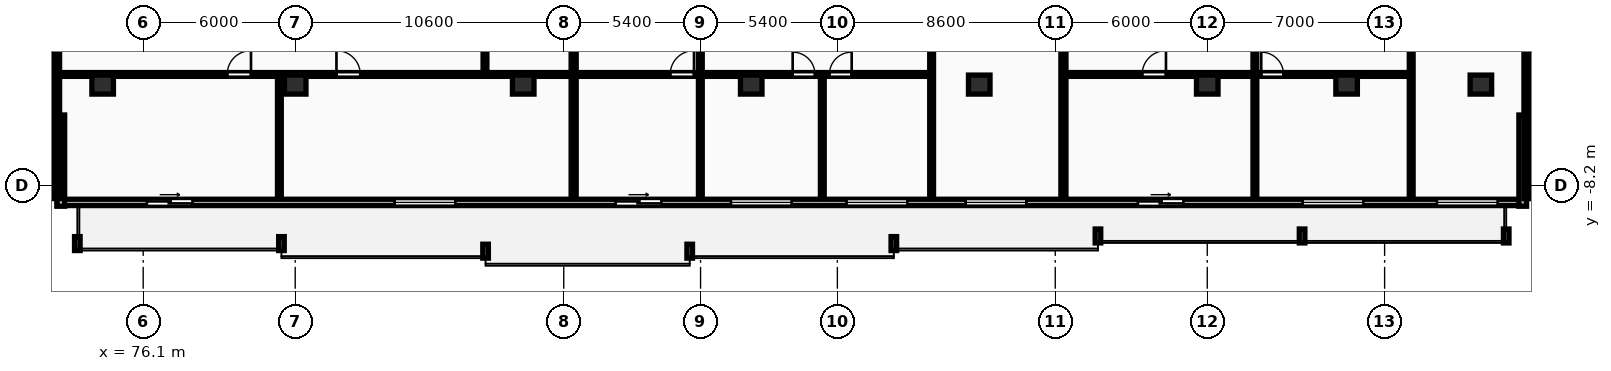
"""IFC4 building model, lengths in metres.
Left out: names, types, materials, properties, quantities, classifications, styles, units other than length and angle.
Written with IfcOpenShell. Run it as: python <this file> out.ifc"""

import sys

from ifc_helpers import new_model, si_unit, direction, frame, frame_2d, origin, origin_2d, place, context, subcontext, project, spatial, rectangle, extrude, element, fill, save


model = new_model("IFC4")
c1 = context("Model", 3, precision=1e-05, world=origin(), true_north=direction((0.0, 1.0)))
c2 = subcontext(c1, "Body", "Model", "MODEL_VIEW")
j1 = project(units=[si_unit("LENGTHUNIT", "METRE"), si_unit("PLANEANGLEUNIT", "RADIAN")], contexts=[c1])
p1 = place(None, origin())
s1 = spatial("IfcSite", under=j1, at=p1, CompositionType="ELEMENT")
p2 = place(p1, origin())
s2 = spatial("IfcBuilding", under=s1, at=p2, CompositionType="ELEMENT")
p3 = place(p2, frame((0.0, 0.0, 119.8)))
s3 = spatial("IfcBuildingStorey", under=s2, at=p3, CompositionType="ELEMENT", Elevation=119.8)
for number, where, z_axis, x_axis in (
    (1, (74.5, -4.2, 0.0), (0.0, 0.0, 1.0), (1.0, 0.0, 0.0)),
    (2, (82.1, -4.2, 0.0), (0.0, 0.0, 1.0), (1.0, 0.0, 0.0)),
    (3, (91.1, -4.2, 0.0), (0.0, 0.0, 1.0), (1.0, 0.0, 0.0)),
    (4, (100.1, -4.2, 0.0), (0.0, 0.0, 1.0), (1.0, 0.0, 0.0)),
    (5, (109.1, -4.2, 0.0), (0.0, 0.0, 1.0), (1.0, 0.0, 0.0)),
    (6, (118.1, -4.2, 0.0), (0.0, 0.0, 1.0), (1.0, 0.0, 0.0)),
    (7, (123.6, -4.2, 0.0), (0.0, 0.0, 1.0), (1.0, 0.0, 0.0)),
    (8, (128.9, -4.2, 0.0), (0.0, 0.0, 1.0), (1.0, 0.0, 0.0)),
):
    element("IfcColumn", number, at=place(p3, frame(where, z_axis=z_axis, x_axis=x_axis)), inside=s3, PredefinedType="COLUMN", context=c2, shape_type="SweptSolid", body=[
        extrude(rectangle(XDim=0.85, YDim=0.75, at=origin_2d()), origin(), (0.0, 0.0, 1.0), 3.25),
    ])
p4 = place(p3, frame((72.7, -8.85, 0.0), z_axis=(0.0, 0.0, 1.0), x_axis=(1.0, 0.0, 0.0)))
e9 = element("IfcWall", 9, at=p4, inside=s3, PredefinedType="STANDARD", context=c2, shape_type="SweptSolid", body=[
    extrude(rectangle(XDim=58.0, YDim=0.25, at=frame_2d((29.0, 0.0))), origin(), (0.0, 0.0, 1.0), 2.97),
])
p5 = place(p4, frame((3.548, 0.0, 0.0)))
e10 = element("IfcOpeningElement", 10, at=p5, cuts=e9, PredefinedType="OPENING", context=c2, shape_type="SweptSolid", body=[
    extrude(rectangle(XDim=1.8, YDim=2.2, at=frame_2d((0.9, 1.1))), frame((0.0, 0.135, 0.0), z_axis=(0.0, -1.0, 0.0), x_axis=(1.0, 0.0, 0.0)), (0.0, 0.0, 1.0), 0.27),
])
p6 = place(p4, frame((13.323, 0.0, 0.85)))
e11 = element("IfcOpeningElement", 11, at=p6, cuts=e9, PredefinedType="OPENING", context=c2, shape_type="SweptSolid", body=[
    extrude(rectangle(XDim=2.4, YDim=1.9, at=frame_2d((1.2, 0.95))), frame((0.0, 0.135, 0.0), z_axis=(0.0, -1.0, 0.0), x_axis=(1.0, 0.0, 0.0)), (0.0, 0.0, 1.0), 0.27),
])
p7 = place(p4, frame((26.598, 0.0, 0.85)))
e12 = element("IfcOpeningElement", 12, at=p7, cuts=e9, PredefinedType="OPENING", context=c2, shape_type="SweptSolid", body=[
    extrude(rectangle(XDim=2.4, YDim=1.9, at=frame_2d((1.2, 0.95))), frame((0.0, 0.135, 0.0), z_axis=(0.0, -1.0, 0.0), x_axis=(1.0, 0.0, 0.0)), (0.0, 0.0, 1.0), 0.27),
])
p8 = place(p4, frame((31.163, 0.0, 0.85)))
e13 = element("IfcOpeningElement", 13, at=p8, cuts=e9, PredefinedType="OPENING", context=c2, shape_type="SweptSolid", body=[
    extrude(rectangle(XDim=2.4, YDim=1.9, at=frame_2d((1.2, 0.95))), frame((0.0, 0.135, 0.0), z_axis=(0.0, -1.0, 0.0), x_axis=(1.0, 0.0, 0.0)), (0.0, 0.0, 1.0), 0.27),
])
p9 = place(p4, frame((22.051, 0.0, 0.0)))
e14 = element("IfcOpeningElement", 14, at=p9, cuts=e9, PredefinedType="OPENING", context=c2, shape_type="SweptSolid", body=[
    extrude(rectangle(XDim=1.8, YDim=2.2, at=frame_2d((0.9, 1.1))), frame((0.0, 0.135, 0.0), z_axis=(0.0, -1.0, 0.0), x_axis=(1.0, 0.0, 0.0)), (0.0, 0.0, 1.0), 0.27),
])
p10 = place(p4, frame((35.861, 0.0, 0.85)))
e15 = element("IfcOpeningElement", 15, at=p10, cuts=e9, PredefinedType="OPENING", context=c2, shape_type="SweptSolid", body=[
    extrude(rectangle(XDim=2.4, YDim=1.9, at=frame_2d((1.2, 0.95))), frame((0.0, 0.135, 0.0), z_axis=(0.0, -1.0, 0.0), x_axis=(1.0, 0.0, 0.0)), (0.0, 0.0, 1.0), 0.27),
])
p11 = place(p4, frame((49.165, 0.0, 0.85)))
e16 = element("IfcOpeningElement", 16, at=p11, cuts=e9, PredefinedType="OPENING", context=c2, shape_type="SweptSolid", body=[
    extrude(rectangle(XDim=2.4, YDim=1.9, at=frame_2d((1.2, 0.95))), frame((0.0, 0.135, 0.0), z_axis=(0.0, -1.0, 0.0), x_axis=(1.0, 0.0, 0.0)), (0.0, 0.0, 1.0), 0.27),
])
p12 = place(p4, frame((42.661, 0.0, 0.0)))
e17 = element("IfcOpeningElement", 17, at=p12, cuts=e9, PredefinedType="OPENING", context=c2, shape_type="SweptSolid", body=[
    extrude(rectangle(XDim=1.8, YDim=2.2, at=frame_2d((0.9, 1.1))), frame((0.0, 0.135, 0.0), z_axis=(0.0, -1.0, 0.0), x_axis=(1.0, 0.0, 0.0)), (0.0, 0.0, 1.0), 0.27),
])
p13 = place(p4, frame((54.465, 0.0, 0.85)))
e18 = element("IfcOpeningElement", 18, at=p13, cuts=e9, PredefinedType="OPENING", context=c2, shape_type="SweptSolid", body=[
    extrude(rectangle(XDim=2.4, YDim=1.9, at=frame_2d((1.2, 0.95))), frame((0.0, 0.135, 0.0), z_axis=(0.0, -1.0, 0.0), x_axis=(1.0, 0.0, 0.0)), (0.0, 0.0, 1.0), 0.27),
])
for number, where, z_axis, x_axis in (
    (19, (130.55, -9.0, 0.0), (0.0, 0.0, 1.0), (0.0, 1.0, 0.0)),
    (20, (130.7, -5.25, 0.0), (0.0, 0.0, 1.0), (1.0, 0.0, 0.0)),
):
    element("IfcWall", number, at=place(p3, frame(where, z_axis=z_axis, x_axis=x_axis)), inside=s3, PredefinedType="STANDARD", context=c2, shape_type="SweptSolid", body=[
        extrude(rectangle(XDim=3.6, YDim=0.3, at=frame_2d((1.8, 0.0))), origin(), (0.0, 0.0, 1.0), 2.97),
    ])
p14 = place(p3, frame((69.1, -5.25, 0.0), z_axis=(0.0, 0.0, 1.0), x_axis=(1.0, 0.0, 0.0)))
e21 = element("IfcWall", 21, at=p14, inside=s3, PredefinedType="STANDARD", context=c2, shape_type="SweptSolid", body=[
    extrude(rectangle(XDim=3.6, YDim=0.3, at=frame_2d((1.8, 0.0))), origin(), (0.0, 0.0, 1.0), 2.97),
])
p15 = place(p3, frame((72.85, -5.4, 0.0), z_axis=(0.0, 0.0, 1.0), x_axis=(0.0, -1.0, 0.0)))
e22 = element("IfcWall", 22, at=p15, inside=s3, PredefinedType="STANDARD", context=c2, shape_type="SweptSolid", body=[
    extrude(rectangle(XDim=3.6, YDim=0.3, at=frame_2d((1.8, 0.0))), origin(), (0.0, 0.0, 1.0), 2.97),
])
for number, where, z_axis, x_axis in (
    (23, (72.7, -8.7, 0.0), (0.0, 0.0, 1.0), (0.0, 1.0, 0.0)),
    (24, (130.7, -8.7, 0.0), (0.0, 0.0, 1.0), (0.0, 1.0, 0.0)),
    (25, (93.091, -8.7, 0.0), (0.0, 0.0, 1.0), (0.0, 1.0, 0.0)),
):
    element("IfcWall", number, at=place(p3, frame(where, z_axis=z_axis, x_axis=x_axis)), inside=s3, PredefinedType="PARTITIONING", context=c2, shape_type="SweptSolid", body=[
        extrude(rectangle(XDim=24.57, YDim=0.2, at=frame_2d((12.285, 0.0))), origin(), (0.0, 0.0, 1.0), 2.97),
    ])
p16 = place(p3, frame((89.591, -3.74, 0.0), z_axis=(0.0, 0.0, 1.0), x_axis=(0.0, 1.0, 0.0)))
e26 = element("IfcWall", 26, at=p16, inside=s3, PredefinedType="PARTITIONING", context=c2, shape_type="SweptSolid", body=[
    extrude(rectangle(XDim=19.63, YDim=0.15, at=frame_2d((9.815, 0.0))), origin(), (0.0, 0.0, 1.0), 2.97),
])
p17 = place(p16, frame((2.406, 0.0, 0.0)))
e27 = element("IfcOpeningElement", 27, at=p17, cuts=e26, PredefinedType="OPENING", context=c2, shape_type="SweptSolid", body=[
    extrude(rectangle(XDim=0.96, YDim=2.1, at=frame_2d((0.48, 1.05))), frame((0.0, 0.085, 0.0), z_axis=(0.0, -1.0, 0.0), x_axis=(1.0, 0.0, 0.0)), (0.0, 0.0, 1.0), 0.17),
])
p18 = place(p16, frame((6.133, 0.0, 0.0)))
e28 = element("IfcOpeningElement", 28, at=p18, cuts=e26, PredefinedType="OPENING", context=c2, shape_type="SweptSolid", body=[
    extrude(rectangle(XDim=0.88, YDim=2.06, at=frame_2d((0.44, 1.03))), frame((0.0, 0.085, 0.0), z_axis=(0.0, -1.0, 0.0), x_axis=(1.0, 0.0, 0.0)), (0.0, 0.0, 1.0), 0.17),
])
p19 = place(p16, frame((7.903, 0.0, 0.0)))
e29 = element("IfcOpeningElement", 29, at=p19, cuts=e26, PredefinedType="OPENING", context=c2, shape_type="SweptSolid", body=[
    extrude(rectangle(XDim=0.84, YDim=2.04, at=frame_2d((0.42, 1.02))), frame((0.0, 0.085, 0.0), z_axis=(0.0, -1.0, 0.0), x_axis=(1.0, 0.0, 0.0)), (0.0, 0.0, 1.0), 0.17),
])
p20 = place(p3, frame((81.475, -8.7, 0.0), z_axis=(0.0, 0.0, 1.0), x_axis=(0.0, 1.0, 0.0)))
e30 = element("IfcWall", 30, at=p20, inside=s3, PredefinedType="PARTITIONING", context=c2, shape_type="SweptSolid", body=[
    extrude(rectangle(XDim=4.82, YDim=0.15, at=frame_2d((2.41, 0.0))), origin(), (0.0, 0.0, 1.0), 2.97),
])
p21 = place(p3, frame((72.78, -3.8, 0.0), z_axis=(0.0, 0.0, 1.0), x_axis=(1.0, 0.0, 0.0)))
e31 = element("IfcWall", 31, at=p21, inside=s3, PredefinedType="PARTITIONING", context=c2, shape_type="SweptSolid", body=[
    extrude(rectangle(XDim=20.231, YDim=0.15, at=frame_2d((10.115, 0.0))), origin(), (0.0, 0.0, 1.0), 2.97),
])
p22 = place(p21, frame((6.635, 0.0, 0.0)))
e32 = element("IfcOpeningElement", 32, at=p22, cuts=e31, PredefinedType="OPENING", context=c2, shape_type="SweptSolid", body=[
    extrude(rectangle(XDim=0.94, YDim=2.1, at=frame_2d((0.47, 1.05))), frame((0.0, 0.085, 0.0), z_axis=(0.0, -1.0, 0.0), x_axis=(1.0, 0.0, 0.0)), (0.0, 0.0, 1.0), 0.17),
])
p23 = place(p21, frame((10.948, 0.0, 0.0)))
e33 = element("IfcOpeningElement", 33, at=p23, cuts=e31, PredefinedType="OPENING", context=c2, shape_type="SweptSolid", body=[
    extrude(rectangle(XDim=0.94, YDim=2.1, at=frame_2d((0.47, 1.05))), frame((0.0, 0.085, 0.0), z_axis=(0.0, -1.0, 0.0), x_axis=(1.0, 0.0, 0.0)), (0.0, 0.0, 1.0), 0.17),
])
p24 = place(p3, frame((112.423, -8.7, 0.0), z_axis=(0.0, 0.0, 1.0), x_axis=(0.0, 1.0, 0.0)))
e34 = element("IfcWall", 34, at=p24, inside=s3, PredefinedType="PARTITIONING", context=c2, shape_type="SweptSolid", body=[
    extrude(rectangle(XDim=24.57, YDim=0.2, at=frame_2d((12.285, 0.0))), origin(), (0.0, 0.0, 1.0), 2.97),
])
p25 = place(p3, frame((102.906, -8.7, 0.0), z_axis=(0.0, 0.0, 1.0), x_axis=(0.0, 1.0, 0.0)))
e35 = element("IfcWall", 35, at=p25, inside=s3, PredefinedType="PARTITIONING", context=c2, shape_type="SweptSolid", body=[
    extrude(rectangle(XDim=4.82, YDim=0.15, at=frame_2d((2.41, 0.0))), origin(), (0.0, 0.0, 1.0), 2.97),
])
p26 = place(p3, frame((98.091, -8.7, 0.0), z_axis=(0.0, 0.0, 1.0), x_axis=(0.0, 1.0, 0.0)))
e36 = element("IfcWall", 36, at=p26, inside=s3, PredefinedType="PARTITIONING", context=c2, shape_type="SweptSolid", body=[
    extrude(rectangle(XDim=9.96, YDim=0.15, at=frame_2d((4.98, 0.0))), origin(), (0.0, 0.0, 1.0), 2.97),
])
p27 = place(p26, frame((6.123, 0.0, 0.0)))
e37 = element("IfcOpeningElement", 37, at=p27, cuts=e36, PredefinedType="OPENING", context=c2, shape_type="SweptSolid", body=[
    extrude(rectangle(XDim=0.92, YDim=2.08, at=frame_2d((0.46, 1.04))), frame((0.0, 0.085, 0.0), z_axis=(0.0, -1.0, 0.0), x_axis=(1.0, 0.0, 0.0)), (0.0, 0.0, 1.0), 0.17),
])
p28 = place(p3, frame((107.22, -8.7, 0.0), z_axis=(0.0, 0.0, 1.0), x_axis=(0.0, 1.0, 0.0)))
e38 = element("IfcWall", 38, at=p28, inside=s3, PredefinedType="PARTITIONING", context=c2, shape_type="SweptSolid", body=[
    extrude(rectangle(XDim=7.45, YDim=0.15, at=frame_2d((3.725, 0.0))), origin(), (0.0, 0.0, 1.0), 2.97),
])
p29 = place(p28, frame((6.123, 0.0, 0.0)))
e39 = element("IfcOpeningElement", 39, at=p29, cuts=e38, PredefinedType="OPENING", context=c2, shape_type="SweptSolid", body=[
    extrude(rectangle(XDim=0.92, YDim=2.08, at=frame_2d((0.46, 1.04))), frame((0.0, 0.085, 0.0), z_axis=(0.0, -1.0, 0.0), x_axis=(1.0, 0.0, 0.0)), (0.0, 0.0, 1.0), 0.17),
])
p30 = place(p3, frame((93.171, -3.8, 0.0), z_axis=(0.0, 0.0, 1.0), x_axis=(1.0, 0.0, 0.0)))
e40 = element("IfcWall", 40, at=p30, inside=s3, PredefinedType="PARTITIONING", context=c2, shape_type="SweptSolid", body=[
    extrude(rectangle(XDim=14.049, YDim=0.15, at=frame_2d((7.024, 0.0))), origin(), (0.0, 0.0, 1.0), 2.97),
])
p31 = place(p30, frame((3.73, 0.0, 0.0)))
e41 = element("IfcOpeningElement", 41, at=p31, cuts=e40, PredefinedType="OPENING", context=c2, shape_type="SweptSolid", body=[
    extrude(rectangle(XDim=0.94, YDim=2.1, at=frame_2d((0.47, 1.05))), frame((0.0, 0.085, 0.0), z_axis=(0.0, -1.0, 0.0), x_axis=(1.0, 0.0, 0.0)), (0.0, 0.0, 1.0), 0.17),
])
p32 = place(p30, frame((8.565, 0.0, 0.0)))
e42 = element("IfcOpeningElement", 42, at=p32, cuts=e40, PredefinedType="OPENING", context=c2, shape_type="SweptSolid", body=[
    extrude(rectangle(XDim=0.88, YDim=2.06, at=frame_2d((0.44, 1.03))), frame((0.0, 0.085, 0.0), z_axis=(0.0, -1.0, 0.0), x_axis=(1.0, 0.0, 0.0)), (0.0, 0.0, 1.0), 0.17),
])
p33 = place(p30, frame((10.014, 0.0, 0.0)))
e43 = element("IfcOpeningElement", 43, at=p33, cuts=e40, PredefinedType="OPENING", context=c2, shape_type="SweptSolid", body=[
    extrude(rectangle(XDim=0.88, YDim=2.06, at=frame_2d((0.44, 1.03))), frame((0.0, 0.085, 0.0), z_axis=(0.0, -1.0, 0.0), x_axis=(1.0, 0.0, 0.0)), (0.0, 0.0, 1.0), 0.17),
])
p34 = place(p3, frame((119.98, -8.7, 0.0), z_axis=(0.0, 0.0, 1.0), x_axis=(0.0, 1.0, 0.0)))
e44 = element("IfcWall", 44, at=p34, inside=s3, PredefinedType="PARTITIONING", context=c2, shape_type="SweptSolid", body=[
    extrude(rectangle(XDim=9.96, YDim=0.15, at=frame_2d((4.98, 0.0))), origin(), (0.0, 0.0, 1.0), 2.97),
])
p35 = place(p34, frame((6.05, 0.0, 0.0)))
e45 = element("IfcOpeningElement", 45, at=p35, cuts=e44, PredefinedType="OPENING", context=c2, shape_type="SweptSolid", body=[
    extrude(rectangle(XDim=0.92, YDim=2.08, at=frame_2d((0.46, 1.04))), frame((0.0, 0.085, 0.0), z_axis=(0.0, -1.0, 0.0), x_axis=(1.0, 0.0, 0.0)), (0.0, 0.0, 1.0), 0.17),
])
p36 = place(p3, frame((126.15, -8.7, 0.0), z_axis=(0.0, 0.0, 1.0), x_axis=(0.0, 1.0, 0.0)))
e46 = element("IfcWall", 46, at=p36, inside=s3, PredefinedType="PARTITIONING", context=c2, shape_type="SweptSolid", body=[
    extrude(rectangle(XDim=7.23, YDim=0.15, at=frame_2d((3.615, 0.0))), origin(), (0.0, 0.0, 1.0), 2.97),
])
p37 = place(p36, frame((6.11, 0.0, 0.0)))
e47 = element("IfcOpeningElement", 47, at=p37, cuts=e46, PredefinedType="OPENING", context=c2, shape_type="SweptSolid", body=[
    extrude(rectangle(XDim=0.92, YDim=2.08, at=frame_2d((0.46, 1.04))), frame((0.0, 0.085, 0.0), z_axis=(0.0, -1.0, 0.0), x_axis=(1.0, 0.0, 0.0)), (0.0, 0.0, 1.0), 0.17),
])
p38 = place(p3, frame((112.503, -3.8, 0.0), z_axis=(0.0, 0.0, 1.0), x_axis=(1.0, 0.0, 0.0)))
e48 = element("IfcWall", 48, at=p38, inside=s3, PredefinedType="PARTITIONING", context=c2, shape_type="SweptSolid", body=[
    extrude(rectangle(XDim=13.647, YDim=0.15, at=frame_2d((6.824, 0.0))), origin(), (0.0, 0.0, 1.0), 2.97),
])
p39 = place(p38, frame((3.027, 0.0, 0.0)))
e49 = element("IfcOpeningElement", 49, at=p39, cuts=e48, PredefinedType="OPENING", context=c2, shape_type="SweptSolid", body=[
    extrude(rectangle(XDim=0.94, YDim=2.1, at=frame_2d((0.47, 1.05))), frame((0.0, 0.085, 0.0), z_axis=(0.0, -1.0, 0.0), x_axis=(1.0, 0.0, 0.0)), (0.0, 0.0, 1.0), 0.17),
])
p40 = place(p38, frame((7.727, 0.0, 0.0)))
e50 = element("IfcOpeningElement", 50, at=p40, cuts=e48, PredefinedType="OPENING", context=c2, shape_type="SweptSolid", body=[
    extrude(rectangle(XDim=0.88, YDim=2.06, at=frame_2d((0.44, 1.03))), frame((0.0, 0.085, 0.0), z_axis=(0.0, -1.0, 0.0), x_axis=(1.0, 0.0, 0.0)), (0.0, 0.0, 1.0), 0.17),
])
p41 = place(p5, origin())
e51 = element("IfcDoor", 51, at=p41, inside=s3, OperationType="SLIDING_TO_RIGHT", PredefinedType="DOOR", context=c2, shape_type="SweptSolid", body=[
    extrude(rectangle(XDim=1.8, YDim=2.2, at=frame_2d((0.9, 1.1))), frame((0.0, 0.025, 0.0), z_axis=(0.0, -1.0, 0.0), x_axis=(1.0, 0.0, 0.0)), (0.0, 0.0, 1.0), 0.05),
])
fill(e10, e51)
p42 = place(p6, origin())
e52 = element("IfcWindow", 52, at=p42, inside=s3, PartitioningType="DOUBLE_PANEL_VERTICAL", PredefinedType="WINDOW", context=c2, shape_type="SweptSolid", body=[
    extrude(rectangle(XDim=2.4, YDim=1.9, at=frame_2d((1.2, 0.95))), frame((0.0, 0.03, 0.0), z_axis=(0.0, -1.0, 0.0), x_axis=(1.0, 0.0, 0.0)), (0.0, 0.0, 1.0), 0.06),
])
fill(e11, e52)
p43 = place(p7, origin())
e53 = element("IfcWindow", 53, at=p43, inside=s3, PartitioningType="DOUBLE_PANEL_VERTICAL", PredefinedType="WINDOW", context=c2, shape_type="SweptSolid", body=[
    extrude(rectangle(XDim=2.4, YDim=1.9, at=frame_2d((1.2, 0.95))), frame((0.0, 0.03, 0.0), z_axis=(0.0, -1.0, 0.0), x_axis=(1.0, 0.0, 0.0)), (0.0, 0.0, 1.0), 0.06),
])
fill(e12, e53)
p44 = place(p8, origin())
e54 = element("IfcWindow", 54, at=p44, inside=s3, PartitioningType="DOUBLE_PANEL_VERTICAL", PredefinedType="WINDOW", context=c2, shape_type="SweptSolid", body=[
    extrude(rectangle(XDim=2.4, YDim=1.9, at=frame_2d((1.2, 0.95))), frame((0.0, 0.03, 0.0), z_axis=(0.0, -1.0, 0.0), x_axis=(1.0, 0.0, 0.0)), (0.0, 0.0, 1.0), 0.06),
])
fill(e13, e54)
p45 = place(p9, origin())
e55 = element("IfcDoor", 55, at=p45, inside=s3, OperationType="SLIDING_TO_RIGHT", PredefinedType="DOOR", context=c2, shape_type="SweptSolid", body=[
    extrude(rectangle(XDim=1.8, YDim=2.2, at=frame_2d((0.9, 1.1))), frame((0.0, 0.025, 0.0), z_axis=(0.0, -1.0, 0.0), x_axis=(1.0, 0.0, 0.0)), (0.0, 0.0, 1.0), 0.05),
])
fill(e14, e55)
p46 = place(p10, origin())
e56 = element("IfcWindow", 56, at=p46, inside=s3, PartitioningType="DOUBLE_PANEL_VERTICAL", PredefinedType="WINDOW", context=c2, shape_type="SweptSolid", body=[
    extrude(rectangle(XDim=2.4, YDim=1.9, at=frame_2d((1.2, 0.95))), frame((0.0, 0.03, 0.0), z_axis=(0.0, -1.0, 0.0), x_axis=(1.0, 0.0, 0.0)), (0.0, 0.0, 1.0), 0.06),
])
fill(e15, e56)
p47 = place(p11, origin())
e57 = element("IfcWindow", 57, at=p47, inside=s3, PartitioningType="DOUBLE_PANEL_VERTICAL", PredefinedType="WINDOW", context=c2, shape_type="SweptSolid", body=[
    extrude(rectangle(XDim=2.4, YDim=1.9, at=frame_2d((1.2, 0.95))), frame((0.0, 0.03, 0.0), z_axis=(0.0, -1.0, 0.0), x_axis=(1.0, 0.0, 0.0)), (0.0, 0.0, 1.0), 0.06),
])
fill(e16, e57)
p48 = place(p12, origin())
e58 = element("IfcDoor", 58, at=p48, inside=s3, OperationType="SLIDING_TO_RIGHT", PredefinedType="DOOR", context=c2, shape_type="SweptSolid", body=[
    extrude(rectangle(XDim=1.8, YDim=2.2, at=frame_2d((0.9, 1.1))), frame((0.0, 0.025, 0.0), z_axis=(0.0, -1.0, 0.0), x_axis=(1.0, 0.0, 0.0)), (0.0, 0.0, 1.0), 0.05),
])
fill(e17, e58)
p49 = place(p13, origin())
e59 = element("IfcWindow", 59, at=p49, inside=s3, PartitioningType="DOUBLE_PANEL_VERTICAL", PredefinedType="WINDOW", context=c2, shape_type="SweptSolid", body=[
    extrude(rectangle(XDim=2.4, YDim=1.9, at=frame_2d((1.2, 0.95))), frame((0.0, 0.03, 0.0), z_axis=(0.0, -1.0, 0.0), x_axis=(1.0, 0.0, 0.0)), (0.0, 0.0, 1.0), 0.06),
])
fill(e18, e59)
p50 = place(p22, origin())
e60 = element("IfcDoor", 60, at=p50, inside=s3, OperationType="SINGLE_SWING_RIGHT", PredefinedType="DOOR", context=c2, shape_type="SweptSolid", body=[
    extrude(rectangle(XDim=0.94, YDim=2.1, at=frame_2d((0.47, 1.05))), frame((0.0, 0.025, 0.0), z_axis=(0.0, -1.0, 0.0), x_axis=(1.0, 0.0, 0.0)), (0.0, 0.0, 1.0), 0.05),
])
fill(e32, e60)
p51 = place(p23, origin())
e61 = element("IfcDoor", 61, at=p51, inside=s3, OperationType="SINGLE_SWING_LEFT", PredefinedType="DOOR", context=c2, shape_type="SweptSolid", body=[
    extrude(rectangle(XDim=0.94, YDim=2.1, at=frame_2d((0.47, 1.05))), frame((0.0, 0.025, 0.0), z_axis=(0.0, -1.0, 0.0), x_axis=(1.0, 0.0, 0.0)), (0.0, 0.0, 1.0), 0.05),
])
fill(e33, e61)
p52 = place(p31, origin())
e62 = element("IfcDoor", 62, at=p52, inside=s3, OperationType="SINGLE_SWING_RIGHT", PredefinedType="DOOR", context=c2, shape_type="SweptSolid", body=[
    extrude(rectangle(XDim=0.94, YDim=2.1, at=frame_2d((0.47, 1.05))), frame((0.0, 0.025, 0.0), z_axis=(0.0, -1.0, 0.0), x_axis=(1.0, 0.0, 0.0)), (0.0, 0.0, 1.0), 0.05),
])
fill(e41, e62)
p53 = place(p32, origin())
e63 = element("IfcDoor", 63, at=p53, inside=s3, OperationType="SINGLE_SWING_LEFT", PredefinedType="DOOR", context=c2, shape_type="SweptSolid", body=[
    extrude(rectangle(XDim=0.88, YDim=2.06, at=frame_2d((0.44, 1.03))), frame((0.0, 0.025, 0.0), z_axis=(0.0, -1.0, 0.0), x_axis=(1.0, 0.0, 0.0)), (0.0, 0.0, 1.0), 0.05),
])
fill(e42, e63)
p54 = place(p33, origin())
e64 = element("IfcDoor", 64, at=p54, inside=s3, OperationType="SINGLE_SWING_RIGHT", PredefinedType="DOOR", context=c2, shape_type="SweptSolid", body=[
    extrude(rectangle(XDim=0.88, YDim=2.06, at=frame_2d((0.44, 1.03))), frame((0.0, 0.025, 0.0), z_axis=(0.0, -1.0, 0.0), x_axis=(1.0, 0.0, 0.0)), (0.0, 0.0, 1.0), 0.05),
])
fill(e43, e64)
p55 = place(p39, origin())
e65 = element("IfcDoor", 65, at=p55, inside=s3, OperationType="SINGLE_SWING_RIGHT", PredefinedType="DOOR", context=c2, shape_type="SweptSolid", body=[
    extrude(rectangle(XDim=0.94, YDim=2.1, at=frame_2d((0.47, 1.05))), frame((0.0, 0.025, 0.0), z_axis=(0.0, -1.0, 0.0), x_axis=(1.0, 0.0, 0.0)), (0.0, 0.0, 1.0), 0.05),
])
fill(e49, e65)
p56 = place(p40, origin())
e66 = element("IfcDoor", 66, at=p56, inside=s3, OperationType="SINGLE_SWING_LEFT", PredefinedType="DOOR", context=c2, shape_type="SweptSolid", body=[
    extrude(rectangle(XDim=0.88, YDim=2.06, at=frame_2d((0.44, 1.03))), frame((0.0, 0.025, 0.0), z_axis=(0.0, -1.0, 0.0), x_axis=(1.0, 0.0, 0.0)), (0.0, 0.0, 1.0), 0.05),
])
fill(e50, e66)
save(model, sys.argv[1])
